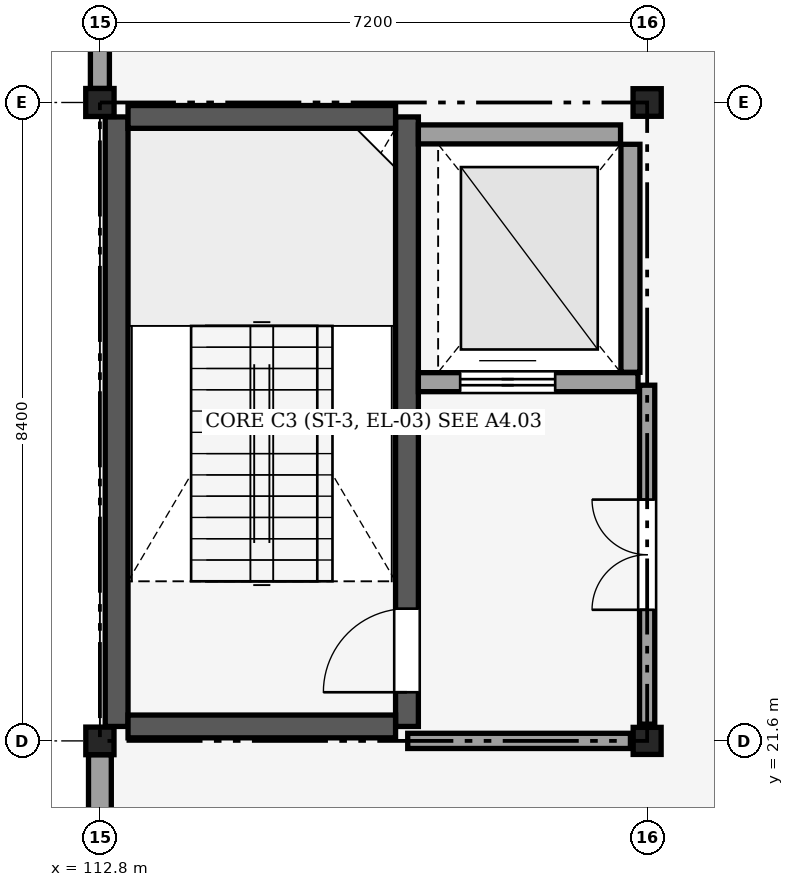
"""IFC4 building model, lengths in metres.
Left out: names, types, materials, properties, quantities, classifications, styles, units other than length and angle.
Written with IfcOpenShell. Run it as: python <this file> out.ifc"""

import sys

from ifc_helpers import new_model, si_unit, direction, frame, frame_2d, origin, origin_2d, place, context, subcontext, project, spatial, rectangle, i_section, extrude, element, fill, save


model = new_model("IFC4")
c1 = context("Model", 3, precision=1e-05, world=origin(), true_north=direction((0.0, 1.0)))
c2 = subcontext(c1, "Body", "Model", "MODEL_VIEW")
j1 = project(units=[si_unit("LENGTHUNIT", "METRE"), si_unit("PLANEANGLEUNIT", "RADIAN")], contexts=[c1])
p1 = place(None, origin())
s1 = spatial("IfcSite", under=j1, at=p1, CompositionType="ELEMENT")
p2 = place(p1, origin())
s2 = spatial("IfcBuilding", under=s1, at=p2, CompositionType="ELEMENT")
p3 = place(p2, frame((0.0, 0.0, 15.0)))
s3 = spatial("IfcBuildingStorey", under=s2, at=p3, CompositionType="ELEMENT", Elevation=15.0)
p4 = place(p3, frame((112.8, 21.6, 0.0), z_axis=(0.0, 0.0, 1.0), x_axis=(1.0, 0.0, 0.0)))
e1 = element("IfcColumn", 1, at=p4, inside=s3, PredefinedType="COLUMN", context=c2, shape_type="SweptSolid", body=[
    extrude(i_section(OverallWidth=0.371, OverallDepth=0.363, WebThickness=0.013, FlangeThickness=0.022, FilletRadius=0.025, at=origin_2d()), origin(), (0.0, 0.0, 1.0), 4.8),
])
p5 = place(p3, frame((112.8, 30.0, 0.0), z_axis=(0.0, 0.0, 1.0), x_axis=(1.0, 0.0, 0.0)))
e2 = element("IfcColumn", 2, at=p5, inside=s3, PredefinedType="COLUMN", context=c2, shape_type="SweptSolid", body=[
    extrude(i_section(OverallWidth=0.373, OverallDepth=0.368, WebThickness=0.015, FlangeThickness=0.024, FilletRadius=0.025, at=origin_2d()), origin(), (0.0, 0.0, 1.0), 4.8),
])
p6 = place(p3, frame((120.0, 21.6, 0.0), z_axis=(0.0, 0.0, 1.0), x_axis=(1.0, 0.0, 0.0)))
e3 = element("IfcColumn", 3, at=p6, inside=s3, PredefinedType="COLUMN", context=c2, shape_type="SweptSolid", body=[
    extrude(i_section(OverallWidth=0.368, OverallDepth=0.356, WebThickness=0.011, FlangeThickness=0.018, FilletRadius=0.025, at=origin_2d()), origin(), (0.0, 0.0, 1.0), 4.8),
])
p7 = place(p3, frame((120.0, 30.0, 0.0), z_axis=(0.0, 0.0, 1.0), x_axis=(1.0, 0.0, 0.0)))
e4 = element("IfcColumn", 4, at=p7, inside=s3, PredefinedType="COLUMN", context=c2, shape_type="SweptSolid", body=[
    extrude(i_section(OverallWidth=0.371, OverallDepth=0.363, WebThickness=0.013, FlangeThickness=0.022, FilletRadius=0.025, at=origin_2d()), origin(), (0.0, 0.0, 1.0), 4.8),
])
p8 = place(p3, frame((112.8, 14.527, 0.0), z_axis=(0.0, 0.0, 1.0), x_axis=(0.0, 1.0, 0.0)))
e5 = element("IfcWall", 5, at=p8, inside=s3, PredefinedType="SOLIDWALL", context=c2, shape_type="SweptSolid", body=[
    extrude(rectangle(XDim=6.891, YDim=0.3, at=frame_2d((3.446, 0.0))), origin(), (0.0, 0.0, 1.0), 3.913),
])
p9 = place(p8, frame((0.75, 0.0, 0.9)))
e6 = element("IfcOpeningElement", 6, at=p9, cuts=e5, PredefinedType="OPENING", context=c2, shape_type="SweptSolid", body=[
    extrude(rectangle(XDim=1.2, YDim=1.5, at=frame_2d((0.6, 0.75))), frame((0.0, 0.16, 0.0), z_axis=(0.0, -1.0, 0.0), x_axis=(1.0, 0.0, 0.0)), (0.0, 0.0, 1.0), 0.321),
])
p10 = place(p3, frame((112.8, 30.184, 0.0), z_axis=(0.0, 0.0, 1.0), x_axis=(0.0, 1.0, 0.0)))
e7 = element("IfcWall", 7, at=p10, inside=s3, PredefinedType="SOLIDWALL", context=c2, shape_type="SweptSolid", body=[
    extrude(rectangle(XDim=8.029, YDim=0.25, at=frame_2d((4.015, 0.0))), origin(), (0.0, 0.0, 1.0), 3.827),
])
p11 = place(p10, frame((3.315, 0.0, 0.9)))
e8 = element("IfcOpeningElement", 8, at=p11, cuts=e7, PredefinedType="OPENING", context=c2, shape_type="SweptSolid", body=[
    extrude(rectangle(XDim=1.4, YDim=1.75, at=frame_2d((0.7, 0.875))), frame((0.0, 0.135, 0.0), z_axis=(0.0, -1.0, 0.0), x_axis=(1.0, 0.0, 0.0)), (0.0, 0.0, 1.0), 0.271),
])
p12 = place(p3, frame((113.02, 21.79, 0.0), z_axis=(0.0, 0.0, 1.0), x_axis=(0.0, 1.0, 0.0)))
e9 = element("IfcWall", 9, at=p12, inside=s3, PredefinedType="SHEAR", context=c2, shape_type="SweptSolid", body=[
    extrude(rectangle(XDim=8.02, YDim=0.3, at=frame_2d((4.01, 0.0))), origin(), (0.0, 0.0, 1.0), 4.54),
])
p13 = place(p3, frame((116.84, 21.79, 0.0), z_axis=(0.0, 0.0, 1.0), x_axis=(0.0, 1.0, 0.0)))
e10 = element("IfcWall", 10, at=p13, inside=s3, PredefinedType="SHEAR", context=c2, shape_type="SweptSolid", body=[
    extrude(rectangle(XDim=8.02, YDim=0.3, at=frame_2d((4.01, 0.0))), origin(), (0.0, 0.0, 1.0), 4.54),
])
p14 = place(p13, frame((0.45, 0.0, 0.0)))
e11 = element("IfcOpeningElement", 11, at=p14, cuts=e10, PredefinedType="OPENING", context=c2, shape_type="SweptSolid", body=[
    extrude(rectangle(XDim=1.1, YDim=2.15, at=frame_2d((0.55, 1.075))), frame((0.0, 0.16, 0.0), z_axis=(0.0, -1.0, 0.0), x_axis=(1.0, 0.0, 0.0)), (0.0, 0.0, 1.0), 0.321),
])
for number, where, z_axis, x_axis in (
    (12, (113.17, 21.79, 0.0), (0.0, 0.0, 1.0), (1.0, 0.0, 0.0)),
    (13, (113.17, 29.81, 0.0), (0.0, 0.0, 1.0), (1.0, 0.0, 0.0)),
):
    element("IfcWall", number, at=place(p3, frame(where, z_axis=z_axis, x_axis=x_axis)), inside=s3, PredefinedType="SHEAR", context=c2, shape_type="SweptSolid", body=[
        extrude(rectangle(XDim=3.52, YDim=0.3, at=frame_2d((1.76, 0.0))), origin(), (0.0, 0.0, 1.0), 4.54),
    ])
p15 = place(p3, frame((116.99, 29.58, 0.0), z_axis=(0.0, 0.0, 1.0), x_axis=(1.0, 0.0, 0.0)))
e14 = element("IfcWall", 14, at=p15, inside=s3, PredefinedType="PARTITIONING", context=c2, shape_type="SweptSolid", body=[
    extrude(rectangle(XDim=2.66, YDim=0.25, at=frame_2d((1.33, 0.0))), origin(), (0.0, 0.0, 1.0), 4.54),
])
p16 = place(p3, frame((119.78, 26.45, 0.0), z_axis=(0.0, 0.0, 1.0), x_axis=(0.0, 1.0, 0.0)))
e15 = element("IfcWall", 15, at=p16, inside=s3, PredefinedType="PARTITIONING", context=c2, shape_type="SweptSolid", body=[
    extrude(rectangle(XDim=3.0, YDim=0.25, at=frame_2d((1.5, 0.0))), origin(), (0.0, 0.0, 1.0), 3.827),
])
p17 = place(p3, frame((116.99, 26.32, 0.0), z_axis=(0.0, 0.0, 1.0), x_axis=(1.0, 0.0, 0.0)))
e16 = element("IfcWall", 16, at=p17, inside=s3, PredefinedType="PARTITIONING", context=c2, shape_type="SweptSolid", body=[
    extrude(rectangle(XDim=2.89, YDim=0.25, at=frame_2d((1.445, 0.0))), origin(), (0.0, 0.0, 1.0), 4.54),
])
p18 = place(p17, frame((0.55, 0.0, 0.0)))
e17 = element("IfcOpeningElement", 17, at=p18, cuts=e16, PredefinedType="OPENING", context=c2, shape_type="SweptSolid", body=[
    extrude(rectangle(XDim=1.25, YDim=2.15, at=frame_2d((0.625, 1.075))), frame((0.0, 0.135, 0.0), z_axis=(0.0, -1.0, 0.0), x_axis=(1.0, 0.0, 0.0)), (0.0, 0.0, 1.0), 0.271),
])
p19 = place(p3, frame((116.85, 21.6, 0.0), z_axis=(0.0, 0.0, 1.0), x_axis=(1.0, 0.0, 0.0)))
e18 = element("IfcWall", 18, at=p19, inside=s3, PredefinedType="PARTITIONING", context=c2, shape_type="SweptSolid", body=[
    extrude(rectangle(XDim=2.93, YDim=0.2, at=frame_2d((1.465, 0.0))), origin(), (0.0, 0.0, 1.0), 3.987),
])
p20 = place(p3, frame((120.0, 21.82, 0.0), z_axis=(0.0, 0.0, 1.0), x_axis=(0.0, 1.0, 0.0)))
e19 = element("IfcWall", 19, at=p20, inside=s3, PredefinedType="PARTITIONING", context=c2, shape_type="SweptSolid", body=[
    extrude(rectangle(XDim=4.46, YDim=0.2, at=frame_2d((2.23, 0.0))), origin(), (0.0, 0.0, 1.0), 3.827),
])
p21 = place(p20, frame((1.505, 0.0, 0.0)))
e20 = element("IfcOpeningElement", 20, at=p21, cuts=e19, PredefinedType="OPENING", context=c2, shape_type="SweptSolid", body=[
    extrude(rectangle(XDim=1.45, YDim=2.2, at=frame_2d((0.725, 1.1))), frame((0.0, 0.11, 0.0), z_axis=(0.0, -1.0, 0.0), x_axis=(1.0, 0.0, 0.0)), (0.0, 0.0, 1.0), 0.22),
])
p22 = place(p14, origin())
e21 = element("IfcDoor", 21, at=p22, inside=s3, OperationType="SINGLE_SWING_LEFT", PredefinedType="DOOR", context=c2, shape_type="SweptSolid", body=[
    extrude(rectangle(XDim=1.1, YDim=2.15, at=frame_2d((0.55, 1.075))), frame((0.0, 0.025, 0.0), z_axis=(0.0, -1.0, 0.0), x_axis=(1.0, 0.0, 0.0)), (0.0, 0.0, 1.0), 0.05),
])
fill(e11, e21)
p23 = place(p18, origin())
e22 = element("IfcDoor", 22, at=p23, inside=s3, OperationType="DOUBLE_DOOR_SLIDING", PredefinedType="DOOR", context=c2, shape_type="SweptSolid", body=[
    extrude(rectangle(XDim=1.25, YDim=2.15, at=frame_2d((0.625, 1.075))), frame((0.0, 0.025, 0.0), z_axis=(0.0, -1.0, 0.0), x_axis=(1.0, 0.0, 0.0)), (0.0, 0.0, 1.0), 0.05),
])
fill(e17, e22)
p24 = place(p21, origin())
e23 = element("IfcDoor", 23, at=p24, inside=s3, OperationType="DOUBLE_DOOR_SINGLE_SWING", PredefinedType="DOOR", context=c2, shape_type="SweptSolid", body=[
    extrude(rectangle(XDim=1.45, YDim=2.2, at=frame_2d((0.725, 1.1))), frame((0.0, 0.025, 0.0), z_axis=(0.0, -1.0, 0.0), x_axis=(1.0, 0.0, 0.0)), (0.0, 0.0, 1.0), 0.05),
])
fill(e20, e23)
save(model, sys.argv[1])
